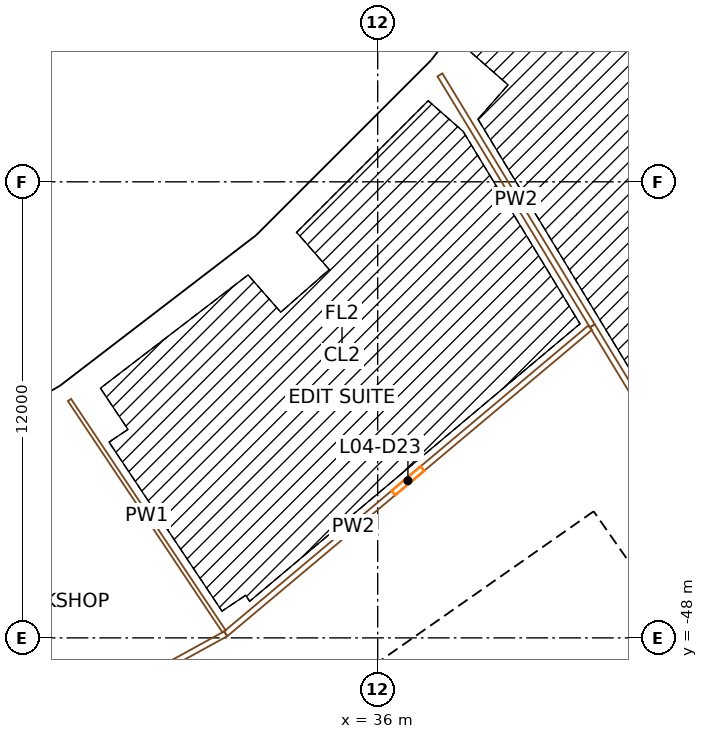
"""IFC4 building model, lengths in metres.
Left out: names, types, materials, properties, quantities, classifications, styles, units other than length and angle.
Written with IfcOpenShell. Run it as: python <this file> out.ifc"""

import sys

from ifc_helpers import new_model, si_unit, direction, frame, frame_2d, origin, origin_2d, place, context, subcontext, project, spatial, rectangle, extrude, element, fill, save


model = new_model("IFC4")
c1 = context("Model", 3, precision=1e-05, world=origin(), true_north=direction((0.0, 1.0)))
c2 = subcontext(c1, "Body", "Model", "MODEL_VIEW")
j1 = project(units=[si_unit("LENGTHUNIT", "METRE"), si_unit("PLANEANGLEUNIT", "RADIAN")], contexts=[c1])
p1 = place(None, origin())
s1 = spatial("IfcSite", under=j1, at=p1, CompositionType="ELEMENT")
p2 = place(p1, origin())
s2 = spatial("IfcBuilding", under=s1, at=p2, CompositionType="ELEMENT")
p3 = place(p2, frame((0.0, 0.0, 31.5)))
s3 = spatial("IfcBuildingStorey", under=s2, at=p3, CompositionType="ELEMENT", Elevation=31.5)
p4 = place(p3, frame((28.195, -42.197, 0.0), z_axis=(0.0, 0.0, 1.0), x_axis=(0.831469612303, 0.55557023302, 0.0)))
e1 = element("IfcColumn", 1, at=p4, inside=s3, PredefinedType="COLUMN", context=c2, shape_type="SweptSolid", body=[
    extrude(rectangle(XDim=1.1, YDim=1.3, at=origin_2d()), origin(), (0.0, 0.0, 1.0), 4.5),
])
p5 = place(p3, frame((32.362, -48.433, 0.0), z_axis=(0.0, 0.0, 1.0), x_axis=(0.831469612303, 0.55557023302, 0.0)))
e2 = element("IfcColumn", 2, at=p5, inside=s3, PredefinedType="COLUMN", context=c2, shape_type="SweptSolid", body=[
    extrude(rectangle(XDim=1.4, YDim=1.8, at=origin_2d()), origin(), (0.0, 0.0, 1.0), 4.5),
])
p6 = place(p3, frame((33.462, -38.156, 0.0), z_axis=(0.0, 0.0, 1.0), x_axis=(0.751839807479, 0.6593458151, 0.0)))
e3 = element("IfcColumn", 3, at=p6, inside=s3, PredefinedType="COLUMN", context=c2, shape_type="SweptSolid", body=[
    extrude(rectangle(XDim=1.1, YDim=1.3, at=origin_2d()), origin(), (0.0, 0.0, 1.0), 4.5),
])
p7 = place(p3, frame((38.407, -43.795, 0.0), z_axis=(0.0, 0.0, 1.0), x_axis=(0.751839807479, 0.6593458151, 0.0)))
e4 = element("IfcColumn", 4, at=p7, inside=s3, PredefinedType="COLUMN", context=c2, shape_type="SweptSolid", body=[
    extrude(rectangle(XDim=1.4, YDim=1.8, at=origin_2d()), origin(), (0.0, 0.0, 1.0), 4.5),
])
p8 = place(p3, frame((38.156, -33.462, 0.0), z_axis=(0.0, 0.0, 1.0), x_axis=(0.6593458151, 0.751839807479, 0.0)))
e5 = element("IfcColumn", 5, at=p8, inside=s3, PredefinedType="COLUMN", context=c2, shape_type="SweptSolid", body=[
    extrude(rectangle(XDim=1.1, YDim=1.3, at=origin_2d()), origin(), (0.0, 0.0, 1.0), 4.5),
])
p9 = place(p3, frame((49.779, -57.191, 0.0), z_axis=(0.0, 0.0, 1.0), x_axis=(-0.573577477574, 0.819151315216, 0.0)))
e6 = element("IfcWall", 6, at=p9, inside=s3, PredefinedType="SHEAR", context=c2, shape_type="SweptSolid", body=[
    extrude(rectangle(XDim=14.8, YDim=0.9, at=frame_2d((7.4, 0.0))), origin(), (0.0, 0.0, 1.0), 4.1),
])
p10 = place(p9, frame((6.7, 0.0, 0.0)))
e7 = element("IfcOpeningElement", 7, at=p10, cuts=e6, PredefinedType="OPENING", context=c2, shape_type="SweptSolid", body=[
    extrude(rectangle(XDim=1.4, YDim=2.1, at=frame_2d((0.7, 1.05))), frame((0.0, 0.46, 0.0), z_axis=(0.0, -1.0, 0.0), x_axis=(1.0, 0.0, 0.0)), (0.0, 0.0, 1.0), 0.92),
])
p11 = place(p3, frame((28.854, -54.324, 0.0), z_axis=(0.0, 0.0, 1.0), x_axis=(0.819145767589, 0.573585400304, 0.0)))
e8 = element("IfcWall", 8, at=p11, inside=s3, PredefinedType="SHEAR", context=c2, shape_type="SweptSolid", body=[
    extrude(rectangle(XDim=15.045, YDim=0.9, at=frame_2d((7.523, 0.0))), origin(), (0.0, 0.0, 1.0), 4.1),
])
p12 = place(p11, frame((1.05, 0.0, 0.0)))
e9 = element("IfcOpeningElement", 9, at=p12, cuts=e8, PredefinedType="OPENING", context=c2, shape_type="SweptSolid", body=[
    extrude(rectangle(XDim=0.9, YDim=2.1, at=frame_2d((0.45, 1.05))), frame((0.0, 0.46, 0.0), z_axis=(0.0, -1.0, 0.0), x_axis=(1.0, 0.0, 0.0)), (0.0, 0.0, 1.0), 0.92),
])
p13 = place(p11, frame((3.775, 0.0, 0.0)))
e10 = element("IfcOpeningElement", 10, at=p13, cuts=e8, PredefinedType="OPENING", context=c2, shape_type="SweptSolid", body=[
    extrude(rectangle(XDim=1.0, YDim=2.1, at=frame_2d((0.5, 1.05))), frame((0.0, 0.46, 0.0), z_axis=(0.0, -1.0, 0.0), x_axis=(1.0, 0.0, 0.0)), (0.0, 0.0, 1.0), 0.92),
])
p14 = place(p11, frame((6.275, 0.0, 0.0)))
e11 = element("IfcOpeningElement", 11, at=p14, cuts=e8, PredefinedType="OPENING", context=c2, shape_type="SweptSolid", body=[
    extrude(rectangle(XDim=1.0, YDim=2.1, at=frame_2d((0.5, 1.05))), frame((0.0, 0.46, 0.0), z_axis=(0.0, -1.0, 0.0), x_axis=(1.0, 0.0, 0.0)), (0.0, 0.0, 1.0), 0.92),
])
p15 = place(p11, frame((13.495, 0.0, 0.0)))
e12 = element("IfcOpeningElement", 12, at=p15, cuts=e8, PredefinedType="OPENING", context=c2, shape_type="SweptSolid", body=[
    extrude(rectangle(XDim=1.1, YDim=2.1, at=frame_2d((0.55, 1.05))), frame((0.0, 0.46, 0.0), z_axis=(0.0, -1.0, 0.0), x_axis=(1.0, 0.0, 0.0)), (0.0, 0.0, 1.0), 0.92),
])
p16 = place(p3, frame((27.714, -41.583, 0.0), z_axis=(0.0, 0.0, 1.0), x_axis=(-0.866022817921, -0.50000447882, 0.0)))
e13 = element("IfcWall", 13, at=p16, inside=s3, PredefinedType="SOLIDWALL", context=c2, shape_type="SweptSolid", body=[
    extrude(rectangle(XDim=6.419, YDim=0.45, at=frame_2d((3.21, 0.0))), origin(), (0.0, 0.0, 1.0), 3.2),
])
p17 = place(p16, frame((3.66, 0.0, 0.9)))
e14 = element("IfcOpeningElement", 14, at=p17, cuts=e13, PredefinedType="OPENING", context=c2, shape_type="SweptSolid", body=[
    extrude(rectangle(XDim=1.2, YDim=2.15, at=frame_2d((0.6, 1.075))), frame((0.0, 0.235, 0.0), z_axis=(0.0, -1.0, 0.0), x_axis=(1.0, 0.0, 0.0)), (0.0, 0.0, 1.0), 0.47),
])
p18 = place(p16, frame((1.56, 0.0, 0.9)))
e15 = element("IfcOpeningElement", 15, at=p18, cuts=e13, PredefinedType="OPENING", context=c2, shape_type="SweptSolid", body=[
    extrude(rectangle(XDim=1.2, YDim=2.15, at=frame_2d((0.6, 1.075))), frame((0.0, 0.235, 0.0), z_axis=(0.0, -1.0, 0.0), x_axis=(1.0, 0.0, 0.0)), (0.0, 0.0, 1.0), 0.47),
])
p19 = place(p3, frame((32.975, -37.555, 0.0), z_axis=(0.0, 0.0, 1.0), x_axis=(-0.793338838284, -0.608780327927, 0.0)))
e16 = element("IfcWall", 16, at=p19, inside=s3, PredefinedType="SOLIDWALL", context=c2, shape_type="SweptSolid", body=[
    extrude(rectangle(XDim=6.597, YDim=0.45, at=frame_2d((3.298, 0.0))), origin(), (0.0, 0.0, 1.0), 3.2),
])
p20 = place(p19, frame((3.749, 0.0, 0.9)))
e17 = element("IfcOpeningElement", 17, at=p20, cuts=e16, PredefinedType="OPENING", context=c2, shape_type="SweptSolid", body=[
    extrude(rectangle(XDim=1.2, YDim=2.15, at=frame_2d((0.6, 1.075))), frame((0.0, 0.235, 0.0), z_axis=(0.0, -1.0, 0.0), x_axis=(1.0, 0.0, 0.0)), (0.0, 0.0, 1.0), 0.47),
])
p21 = place(p19, frame((1.648, 0.0, 0.9)))
e18 = element("IfcOpeningElement", 18, at=p21, cuts=e16, PredefinedType="OPENING", context=c2, shape_type="SweptSolid", body=[
    extrude(rectangle(XDim=1.2, YDim=2.15, at=frame_2d((0.6, 1.075))), frame((0.0, 0.235, 0.0), z_axis=(0.0, -1.0, 0.0), x_axis=(1.0, 0.0, 0.0)), (0.0, 0.0, 1.0), 0.47),
])
p22 = place(p3, frame((37.532, -32.993, 0.0), z_axis=(0.0, 0.0, 1.0), x_axis=(-0.707106781187, -0.707106781187, 0.0)))
e19 = element("IfcWall", 19, at=p22, inside=s3, PredefinedType="SOLIDWALL", context=c2, shape_type="SweptSolid", body=[
    extrude(rectangle(XDim=6.419, YDim=0.45, at=frame_2d((3.209, 0.0))), origin(), (0.0, 0.0, 1.0), 3.2),
])
p23 = place(p22, frame((3.66, 0.0, 0.9)))
e20 = element("IfcOpeningElement", 20, at=p23, cuts=e19, PredefinedType="OPENING", context=c2, shape_type="SweptSolid", body=[
    extrude(rectangle(XDim=1.2, YDim=2.15, at=frame_2d((0.6, 1.075))), frame((0.0, 0.235, 0.0), z_axis=(0.0, -1.0, 0.0), x_axis=(1.0, 0.0, 0.0)), (0.0, 0.0, 1.0), 0.47),
])
p24 = place(p22, frame((1.56, 0.0, 0.9)))
e21 = element("IfcOpeningElement", 21, at=p24, cuts=e19, PredefinedType="OPENING", context=c2, shape_type="SweptSolid", body=[
    extrude(rectangle(XDim=1.2, YDim=2.15, at=frame_2d((0.6, 1.075))), frame((0.0, 0.235, 0.0), z_axis=(0.0, -1.0, 0.0), x_axis=(1.0, 0.0, 0.0)), (0.0, 0.0, 1.0), 0.47),
])
p25 = place(p3, frame((41.571, -27.741, 0.0), z_axis=(0.0, 0.0, 1.0), x_axis=(-0.608780327927, -0.793338838284, 0.0)))
e22 = element("IfcWall", 22, at=p25, inside=s3, PredefinedType="SOLIDWALL", context=c2, shape_type="SweptSolid", body=[
    extrude(rectangle(XDim=6.597, YDim=0.45, at=frame_2d((3.298, 0.0))), origin(), (0.0, 0.0, 1.0), 3.2),
])
p26 = place(p25, frame((3.749, 0.0, 0.9)))
e23 = element("IfcOpeningElement", 23, at=p26, cuts=e22, PredefinedType="OPENING", context=c2, shape_type="SweptSolid", body=[
    extrude(rectangle(XDim=1.2, YDim=2.15, at=frame_2d((0.6, 1.075))), frame((0.0, 0.235, 0.0), z_axis=(0.0, -1.0, 0.0), x_axis=(1.0, 0.0, 0.0)), (0.0, 0.0, 1.0), 0.47),
])
p27 = place(p25, frame((1.648, 0.0, 0.9)))
e24 = element("IfcOpeningElement", 24, at=p27, cuts=e22, PredefinedType="OPENING", context=c2, shape_type="SweptSolid", body=[
    extrude(rectangle(XDim=1.2, YDim=2.15, at=frame_2d((0.6, 1.075))), frame((0.0, 0.235, 0.0), z_axis=(0.0, -1.0, 0.0), x_axis=(1.0, 0.0, 0.0)), (0.0, 0.0, 1.0), 0.47),
])
p28 = place(p3, frame((23.24, -52.697, 0.0), z_axis=(0.0, 0.0, 1.0), x_axis=(0.876826033283, 0.480807765492, 0.0)))
e25 = element("IfcWall", 25, at=p28, inside=s3, PredefinedType="PARTITIONING", context=c2, shape_type="SweptSolid", body=[
    extrude(rectangle(XDim=9.991, YDim=0.15, at=frame_2d((4.996, 0.0))), origin(), (0.0, 0.0, 1.0), 3.1),
])
p29 = place(p28, frame((4.496, 0.0, 0.0)))
e26 = element("IfcOpeningElement", 26, at=p29, cuts=e25, PredefinedType="OPENING", context=c2, shape_type="SweptSolid", body=[
    extrude(rectangle(XDim=1.0, YDim=2.1, at=frame_2d((0.5, 1.05))), frame((0.0, 0.085, 0.0), z_axis=(0.0, -1.0, 0.0), x_axis=(1.0, 0.0, 0.0)), (0.0, 0.0, 1.0), 0.17),
])
p30 = place(p3, frame((27.89, -41.74, 0.0), z_axis=(0.0, 0.0, 1.0), x_axis=(0.555569023768, -0.831470420297, 0.0)))
e27 = element("IfcWall", 27, at=p30, inside=s3, PredefinedType="PARTITIONING", context=c2, shape_type="SweptSolid", body=[
    extrude(rectangle(XDim=7.325, YDim=0.1, at=frame_2d((3.663, 0.0))), origin(), (0.0, 0.0, 1.0), 3.1),
])
p31 = place(p3, frame((32.001, -47.893, 0.0), z_axis=(0.0, 0.0, 1.0), x_axis=(0.765734049768, 0.643157340801, 0.0)))
e28 = element("IfcWall", 28, at=p31, inside=s3, PredefinedType="PARTITIONING", context=c2, shape_type="SweptSolid", body=[
    extrude(rectangle(XDim=12.524, YDim=0.15, at=frame_2d((6.262, 0.0))), origin(), (0.0, 0.0, 1.0), 3.1),
])
p32 = place(p31, frame((5.762, 0.0, 0.0)))
e29 = element("IfcOpeningElement", 29, at=p32, cuts=e28, PredefinedType="OPENING", context=c2, shape_type="SweptSolid", body=[
    extrude(rectangle(XDim=1.0, YDim=2.1, at=frame_2d((0.5, 1.05))), frame((0.0, 0.085, 0.0), z_axis=(0.0, -1.0, 0.0), x_axis=(1.0, 0.0, 0.0)), (0.0, 0.0, 1.0), 0.17),
])
p33 = place(p3, frame((37.638, -33.187, 0.0), z_axis=(0.0, 0.0, 1.0), x_axis=(0.519163683086, -0.854674833, 0.0)))
e30 = element("IfcWall", 30, at=p33, inside=s3, PredefinedType="PARTITIONING", context=c2, shape_type="SweptSolid", body=[
    extrude(rectangle(XDim=7.725, YDim=0.15, at=frame_2d((3.862, 0.0))), origin(), (0.0, 0.0, 1.0), 3.1),
])
p34 = place(p3, frame((41.648, -39.789, 0.0), z_axis=(0.0, 0.0, 1.0), x_axis=(0.519144162426, -0.854686690325, 0.0)))
e31 = element("IfcWall", 31, at=p34, inside=s3, PredefinedType="PARTITIONING", context=c2, shape_type="SweptSolid", body=[
    extrude(rectangle(XDim=9.554, YDim=0.15, at=frame_2d((4.777, 0.0))), origin(), (0.0, 0.0, 1.0), 3.1),
])
p35 = place(p15, origin())
e32 = element("IfcDoor", 32, at=p35, inside=s3, OperationType="SINGLE_SWING_RIGHT", PredefinedType="DOOR", context=c2, shape_type="SweptSolid", body=[
    extrude(rectangle(XDim=1.1, YDim=2.1, at=frame_2d((0.55, 1.05))), frame((0.0, 0.025, 0.0), z_axis=(0.0, -1.0, 0.0), x_axis=(1.0, 0.0, 0.0)), (0.0, 0.0, 1.0), 0.05),
])
fill(e12, e32)
p36 = place(p20, origin())
e33 = element("IfcWindow", 33, at=p36, inside=s3, PartitioningType="SINGLE_PANEL", PredefinedType="WINDOW", context=c2, shape_type="SweptSolid", body=[
    extrude(rectangle(XDim=1.2, YDim=2.15, at=frame_2d((0.6, 1.075))), frame((0.0, 0.03, 0.0), z_axis=(0.0, -1.0, 0.0), x_axis=(1.0, 0.0, 0.0)), (0.0, 0.0, 1.0), 0.06),
])
fill(e17, e33)
p37 = place(p21, origin())
e34 = element("IfcWindow", 34, at=p37, inside=s3, PartitioningType="SINGLE_PANEL", PredefinedType="WINDOW", context=c2, shape_type="SweptSolid", body=[
    extrude(rectangle(XDim=1.2, YDim=2.15, at=frame_2d((0.6, 1.075))), frame((0.0, 0.03, 0.0), z_axis=(0.0, -1.0, 0.0), x_axis=(1.0, 0.0, 0.0)), (0.0, 0.0, 1.0), 0.06),
])
fill(e18, e34)
p38 = place(p23, origin())
e35 = element("IfcWindow", 35, at=p38, inside=s3, PartitioningType="SINGLE_PANEL", PredefinedType="WINDOW", context=c2, shape_type="SweptSolid", body=[
    extrude(rectangle(XDim=1.2, YDim=2.15, at=frame_2d((0.6, 1.075))), frame((0.0, 0.03, 0.0), z_axis=(0.0, -1.0, 0.0), x_axis=(1.0, 0.0, 0.0)), (0.0, 0.0, 1.0), 0.06),
])
fill(e20, e35)
p39 = place(p24, origin())
e36 = element("IfcWindow", 36, at=p39, inside=s3, PartitioningType="SINGLE_PANEL", PredefinedType="WINDOW", context=c2, shape_type="SweptSolid", body=[
    extrude(rectangle(XDim=1.2, YDim=2.15, at=frame_2d((0.6, 1.075))), frame((0.0, 0.03, 0.0), z_axis=(0.0, -1.0, 0.0), x_axis=(1.0, 0.0, 0.0)), (0.0, 0.0, 1.0), 0.06),
])
fill(e21, e36)
p40 = place(p32, origin())
e37 = element("IfcDoor", 37, at=p40, inside=s3, OperationType="SINGLE_SWING_RIGHT", PredefinedType="DOOR", context=c2, shape_type="SweptSolid", body=[
    extrude(rectangle(XDim=1.0, YDim=2.1, at=frame_2d((0.5, 1.05))), frame((0.0, 0.025, 0.0), z_axis=(0.0, -1.0, 0.0), x_axis=(1.0, 0.0, 0.0)), (0.0, 0.0, 1.0), 0.05),
])
fill(e29, e37)
save(model, sys.argv[1])
